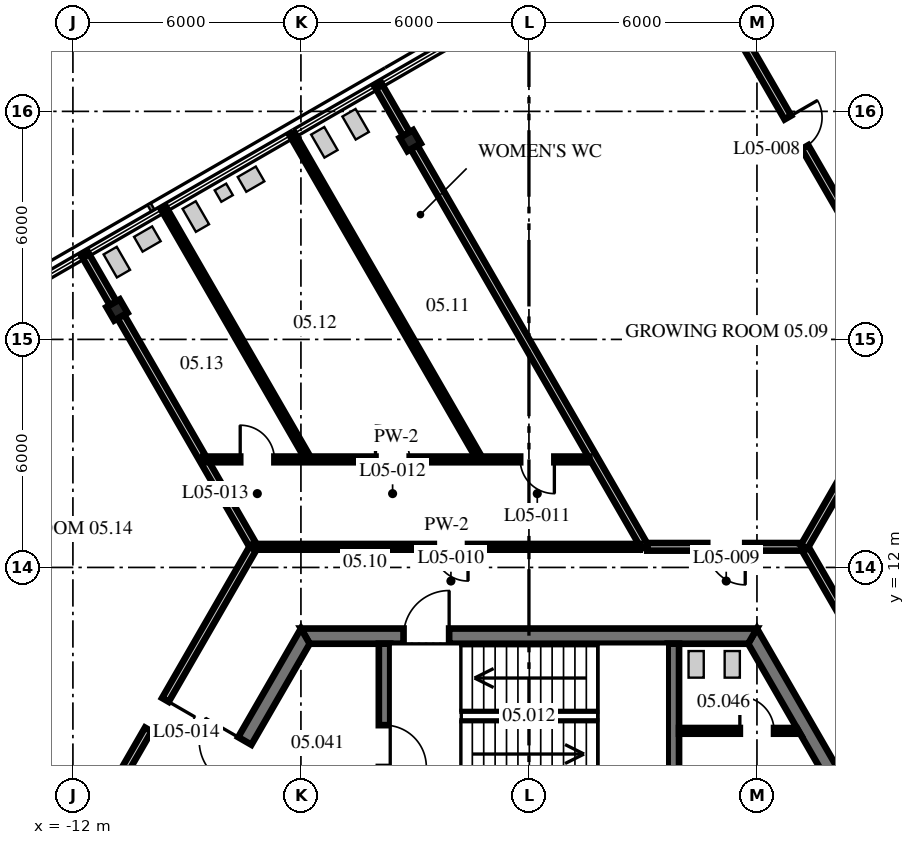
"""IFC4 building model, lengths in metres.
Left out: names, types, materials, properties, quantities, classifications, styles, units other than length and angle.
Written with IfcOpenShell. Run it as: python <this file> out.ifc"""

import sys

from ifc_helpers import new_model, si_unit, direction, frame, frame_2d, origin, origin_2d, place, context, subcontext, project, spatial, polyline, rectangle, i_section, outline, extrude, source, transform, mapped, element, fill, save


model = new_model("IFC4")
c1 = context("Model", 3, precision=1e-05, world=origin(), true_north=direction((0.0, 1.0)))
c2 = subcontext(c1, "Body", "Model", "MODEL_VIEW")
j1 = project(units=[si_unit("LENGTHUNIT", "METRE"), si_unit("PLANEANGLEUNIT", "RADIAN")], contexts=[c1])
p1 = place(None, origin())
s1 = spatial("IfcSite", under=j1, at=p1, CompositionType="ELEMENT")
p2 = place(p1, origin())
s2 = spatial("IfcBuilding", under=s1, at=p2, CompositionType="ELEMENT")
p3 = place(p2, frame((0.0, 0.0, 24.6)))
s3 = spatial("IfcBuildingStorey", under=s2, at=p3, CompositionType="ELEMENT", Elevation=24.6)
m1 = source(origin(), c2, "Body", "SweptSolid", [
    extrude(i_section(OverallWidth=0.404, OverallDepth=0.406, WebThickness=0.027, FlangeThickness=0.044, at=origin_2d()), origin(), (0.0, 0.0, 1.0), 4.3),
])
for number, where, z_axis, x_axis in (
    (1, (-3.124, 23.23, 0.0), (0.0, 0.0, 1.0), (-0.866, -0.5, 0.0)),
    (2, (-10.84, 18.775, 0.0), (0.0, 0.0, 1.0), (-0.866, -0.5, 0.0)),
):
    element("IfcColumn", number, at=place(p3, frame(where, z_axis=z_axis, x_axis=x_axis)), inside=s3, PredefinedType="COLUMN", context=c2, shape_type="MappedRepresentation", body=[
        mapped(m1, transform((0.0, 0.0, 0.0), scale=1.0)),
    ])
m2 = source(origin(), c2, "Body", "SweptSolid", [
    extrude(outline(polyline([(-0.115, -0.2), (11.885, -0.2), (11.654, 0.2), (0.115, 0.2), (-0.115, -0.2)])), origin(), (0.0, 0.0, 1.0), 4.1),
])
p4 = place(p3, frame((11.769, 0.0, 0.0), z_axis=(0.0, 0.0, 1.0), x_axis=(-0.499996592174, 0.866027371285, 0.0)))
e3 = element("IfcWall", 3, at=p4, inside=s3, PredefinedType="SHEAR", context=c2, shape_type="MappedRepresentation", body=[
    mapped(m2, transform((0.0, 0.0, 0.0), scale=1.0)),
])
p5 = place(p4, frame((5.75, 0.0, 0.0)))
e4 = element("IfcOpeningElement", 4, at=p5, cuts=e3, PredefinedType="OPENING", context=c2, shape_type="SweptSolid", body=[
    extrude(rectangle(XDim=1.2, YDim=2.1, at=frame_2d((0.6, 1.05))), frame((0.0, 0.21, 0.0), z_axis=(0.0, -1.0, 0.0), x_axis=(1.0, 0.0, 0.0)), (0.0, 0.0, 1.0), 0.42),
])
p6 = place(p3, frame((5.885, 10.192, 0.0), z_axis=(0.0, 0.0, 1.0), x_axis=(-1.0, 0.0, 0.0)))
e5 = element("IfcWall", 5, at=p6, inside=s3, PredefinedType="SHEAR", context=c2, shape_type="MappedRepresentation", body=[
    mapped(m2, transform((0.0, 0.0, 0.0), scale=1.0)),
])
p7 = place(p6, frame((7.985, 0.0, 0.0)))
e6 = element("IfcOpeningElement", 6, at=p7, cuts=e5, PredefinedType="OPENING", context=c2, shape_type="SweptSolid", body=[
    extrude(rectangle(XDim=1.2, YDim=2.1, at=frame_2d((0.6, 1.05))), frame((0.0, 0.21, 0.0), z_axis=(0.0, -1.0, 0.0), x_axis=(1.0, 0.0, 0.0)), (0.0, 0.0, 1.0), 0.42),
])
p8 = place(p3, frame((-5.885, 10.192, 0.0), z_axis=(0.0, 0.0, 1.0), x_axis=(-0.499996592174, -0.866027371285, 0.0)))
e7 = element("IfcWall", 7, at=p8, inside=s3, PredefinedType="SHEAR", context=c2, shape_type="MappedRepresentation", body=[
    mapped(m2, transform((0.0, 0.0, 0.0), scale=1.0)),
])
p9 = place(p8, frame((3.185, 0.0, 0.0)))
e8 = element("IfcOpeningElement", 8, at=p9, cuts=e7, PredefinedType="OPENING", context=c2, shape_type="SweptSolid", body=[
    extrude(rectangle(XDim=1.2, YDim=2.1, at=frame_2d((0.6, 1.05))), frame((0.0, 0.21, 0.0), z_axis=(0.0, -1.0, 0.0), x_axis=(1.0, 0.0, 0.0)), (0.0, 0.0, 1.0), 0.42),
])
m3 = source(origin(), c2, "Body", "SweptSolid", [
    extrude(outline(polyline([(0.0, -0.15), (0.0, 0.15), (3.804, 0.15), (3.804, -0.15), (0.0, -0.15)])), origin(), (0.0, 0.0, 1.0), 4.1),
])
p10 = place(p3, frame((-3.8, 6.19, 0.0), z_axis=(0.0, 0.0, 1.0), x_axis=(0.0, 1.0, 0.0)))
e9 = element("IfcWall", 9, at=p10, inside=s3, PredefinedType="SHEAR", context=c2, shape_type="MappedRepresentation", body=[
    mapped(m3, transform((0.0, 0.0, 0.0), scale=1.0)),
])
p11 = place(p10, frame((0.56, 0.0, 0.0)))
e10 = element("IfcOpeningElement", 10, at=p11, cuts=e9, PredefinedType="OPENING", context=c2, shape_type="SweptSolid", body=[
    extrude(rectangle(XDim=1.1, YDim=2.1, at=frame_2d((0.55, 1.05))), frame((0.0, 0.16, 0.0), z_axis=(0.0, -1.0, 0.0), x_axis=(1.0, 0.0, 0.0)), (0.0, 0.0, 1.0), 0.32),
])
p12 = place(p3, frame((3.8, 6.19, 0.0), z_axis=(0.0, 0.0, 1.0), x_axis=(0.0, 1.0, 0.0)))
e11 = element("IfcWall", 11, at=p12, inside=s3, PredefinedType="SHEAR", context=c2, shape_type="MappedRepresentation", body=[
    mapped(m3, transform((0.0, 0.0, 0.0), scale=1.0)),
])
m4 = source(origin(), c2, "Body", "SweptSolid", [
    extrude(outline(polyline([(0.0, -0.075), (0.0, 0.075), (3.102, 0.075), (3.188, -0.075), (0.0, -0.075)])), origin(), (0.0, 0.0, 1.0), 4.1),
])
p13 = place(p3, frame((3.95, 7.7, 0.0), z_axis=(0.0, 0.0, 1.0), x_axis=(1.0, 0.0, 0.0)))
e12 = element("IfcWall", 12, at=p13, inside=s3, PredefinedType="PARTITIONING", context=c2, shape_type="MappedRepresentation", body=[
    mapped(m4, transform((0.0, 0.0, 0.0), scale=1.0)),
])
p14 = place(p13, frame((1.6, 0.0, 0.0)))
e13 = element("IfcOpeningElement", 13, at=p14, cuts=e12, PredefinedType="OPENING", context=c2, shape_type="SweptSolid", body=[
    extrude(rectangle(XDim=0.9, YDim=2.1, at=frame_2d((0.45, 1.05))), frame((0.0, 0.085, 0.0), z_axis=(0.0, -1.0, 0.0), x_axis=(1.0, 0.0, 0.0)), (0.0, 0.0, 1.0), 0.17),
])
m5 = source(origin(), c2, "Body", "SweptSolid", [
    extrude(rectangle(XDim=12.148, YDim=0.2, at=frame_2d((6.074, 0.0))), origin(), (0.0, 0.0, 1.0), 3.343),
])
p15 = place(p3, frame((-18.459, 14.153, 0.0), z_axis=(0.0, 0.0, 1.0), x_axis=(0.500006022464, -0.866021926685, 0.0)))
e14 = element("IfcWall", 14, at=p15, inside=s3, PredefinedType="PARTITIONING", context=c2, shape_type="MappedRepresentation", body=[
    mapped(m5, transform((0.0, 0.0, 0.0), scale=1.0)),
])
m6 = source(origin(), c2, "Body", "SweptSolid", [
    extrude(rectangle(XDim=1.499, YDim=0.2, at=frame_2d((0.749, 0.0))), origin(), (0.0, 0.0, 1.0), 4.1),
])
p16 = place(p3, frame((-11.686, 20.24, 0.0), z_axis=(0.0, 0.0, 1.0), x_axis=(0.499976292358, -0.866039090965, 0.0)))
e15 = element("IfcWall", 15, at=p16, inside=s3, PredefinedType="PARTITIONING", context=c2, shape_type="MappedRepresentation", body=[
    mapped(m6, transform((0.0, 0.0, 0.0), scale=1.0)),
])
m7 = source(origin(), c2, "Body", "SweptSolid", [
    extrude(rectangle(XDim=6.934, YDim=0.2, at=frame_2d((3.467, 0.0))), origin(), (0.0, 0.0, 1.0), 3.488),
])
p17 = place(p3, frame((-10.743, 18.608, 0.0), z_axis=(0.0, 0.0, 1.0), x_axis=(0.499986605379, -0.866033137035, 0.0)))
e16 = element("IfcWall", 16, at=p17, inside=s3, PredefinedType="PARTITIONING", context=c2, shape_type="MappedRepresentation", body=[
    mapped(m7, transform((0.0, 0.0, 0.0), scale=1.0)),
])
m8 = source(origin(), c2, "Body", "SweptSolid", [
    extrude(rectangle(XDim=7.509, YDim=0.15, at=frame_2d((3.754, 0.0))), origin(), (0.0, 0.0, 1.0), 4.1),
])
p18 = place(p3, frame((-9.607, 21.44, 0.0), z_axis=(0.0, 0.0, 1.0), x_axis=(0.500006720231, -0.866021523823, 0.0)))
e17 = element("IfcWall", 17, at=p18, inside=s3, PredefinedType="PARTITIONING", context=c2, shape_type="MappedRepresentation", body=[
    mapped(m8, transform((0.0, 0.0, 0.0), scale=1.0)),
])
m9 = source(origin(), c2, "Body", "SweptSolid", [
    extrude(rectangle(XDim=9.764, YDim=0.15, at=frame_2d((4.882, 0.0))), origin(), (0.0, 0.0, 1.0), 4.1),
])
p19 = place(p3, frame((-6.225, 23.393, 0.0), z_axis=(0.0, 0.0, 1.0), x_axis=(0.499990124937, -0.86603110508, 0.0)))
e18 = element("IfcWall", 18, at=p19, inside=s3, PredefinedType="PARTITIONING", context=c2, shape_type="MappedRepresentation", body=[
    mapped(m9, transform((0.0, 0.0, 0.0), scale=1.0)),
])
m10 = source(origin(), c2, "Body", "SweptSolid", [
    extrude(rectangle(XDim=1.499, YDim=0.2, at=frame_2d((0.75, 0.0))), origin(), (0.0, 0.0, 1.0), 4.1),
])
p20 = place(p3, frame((-3.969, 24.695, 0.0), z_axis=(0.0, 0.0, 1.0), x_axis=(0.499905760005, -0.866079806435, 0.0)))
e19 = element("IfcWall", 19, at=p20, inside=s3, PredefinedType="PARTITIONING", context=c2, shape_type="MappedRepresentation", body=[
    mapped(m10, transform((0.0, 0.0, 0.0), scale=1.0)),
])
m11 = source(origin(), c2, "Body", "SweptSolid", [
    extrude(rectangle(XDim=12.148, YDim=0.2, at=frame_2d((6.074, 0.0))), origin(), (0.0, 0.0, 1.0), 3.343),
])
p21 = place(p3, frame((-3.027, 23.063, 0.0), z_axis=(0.0, 0.0, 1.0), x_axis=(0.499997320042, -0.866026951053, 0.0)))
e20 = element("IfcWall", 20, at=p21, inside=s3, PredefinedType="PARTITIONING", context=c2, shape_type="MappedRepresentation", body=[
    mapped(m11, transform((0.0, 0.0, 0.0), scale=1.0)),
])
m12 = source(origin(), c2, "Body", "SweptSolid", [
    extrude(rectangle(XDim=3.885, YDim=0.2, at=frame_2d((1.942, 0.0))), origin(), (0.0, 0.0, 1.0), 4.1),
])
p22 = place(p3, frame((7.276, 12.482, 0.0), z_axis=(0.0, 0.0, 1.0), x_axis=(0.499978127697, -0.866038031396, 0.0)))
e21 = element("IfcWall", 21, at=p22, inside=s3, PredefinedType="PARTITIONING", context=c2, shape_type="MappedRepresentation", body=[
    mapped(m12, transform((0.0, 0.0, 0.0), scale=1.0)),
])
m13 = source(origin(), c2, "Body", "SweptSolid", [
    extrude(rectangle(XDim=7.568, YDim=0.2, at=frame_2d((3.784, 0.0))), origin(), (0.0, 0.0, 1.0), 3.488),
])
p23 = place(p3, frame((4.689, 27.518, 0.0), z_axis=(0.0, 0.0, 1.0), x_axis=(0.499997032024, -0.866027117339, 0.0)))
e22 = element("IfcWall", 22, at=p23, inside=s3, PredefinedType="PARTITIONING", context=c2, shape_type="MappedRepresentation", body=[
    mapped(m13, transform((0.0, 0.0, 0.0), scale=1.0)),
])
p24 = place(p23, frame((4.248, 0.0, 0.0)))
e23 = element("IfcOpeningElement", 23, at=p24, cuts=e22, PredefinedType="OPENING", context=c2, shape_type="SweptSolid", body=[
    extrude(rectangle(XDim=0.9, YDim=2.1, at=frame_2d((0.45, 1.05))), frame((0.0, 0.11, 0.0), z_axis=(0.0, -1.0, 0.0), x_axis=(1.0, 0.0, 0.0)), (0.0, 0.0, 1.0), 0.22),
])
m14 = source(origin(), c2, "Body", "SweptSolid", [
    extrude(rectangle(XDim=10.155, YDim=0.15, at=frame_2d((5.077, 0.0))), origin(), (0.0, 0.0, 1.0), 4.1),
])
p25 = place(p3, frame((-7.241, 12.542, 0.0), z_axis=(0.0, 0.0, 1.0), x_axis=(1.0, 0.0, 0.0)))
e24 = element("IfcWall", 24, at=p25, inside=s3, PredefinedType="PARTITIONING", context=c2, shape_type="MappedRepresentation", body=[
    mapped(m14, transform((0.0, 0.0, 0.0), scale=1.0)),
])
p26 = place(p25, frame((4.738, 0.0, 0.0)))
e25 = element("IfcOpeningElement", 25, at=p26, cuts=e24, PredefinedType="OPENING", context=c2, shape_type="SweptSolid", body=[
    extrude(rectangle(XDim=0.9, YDim=2.1, at=frame_2d((0.45, 1.05))), frame((0.0, 0.085, 0.0), z_axis=(0.0, -1.0, 0.0), x_axis=(1.0, 0.0, 0.0)), (0.0, 0.0, 1.0), 0.17),
])
m15 = source(origin(), c2, "Body", "SweptSolid", [
    extrude(rectangle(XDim=4.058, YDim=0.2, at=frame_2d((2.029, 0.0))), origin(), (0.0, 0.0, 1.0), 4.1),
])
p27 = place(p3, frame((3.114, 12.542, 0.0), z_axis=(0.0, 0.0, 1.0), x_axis=(1.0, 0.0, 0.0)))
e26 = element("IfcWall", 26, at=p27, inside=s3, PredefinedType="PARTITIONING", context=c2, shape_type="MappedRepresentation", body=[
    mapped(m15, transform((0.0, 0.0, 0.0), scale=1.0)),
])
p28 = place(p27, frame((1.578, 0.0, 0.0)))
e27 = element("IfcOpeningElement", 27, at=p28, cuts=e26, PredefinedType="OPENING", context=c2, shape_type="SweptSolid", body=[
    extrude(rectangle(XDim=1.0, YDim=2.1, at=frame_2d((0.5, 1.05))), frame((0.0, 0.11, 0.0), z_axis=(0.0, -1.0, 0.0), x_axis=(1.0, 0.0, 0.0)), (0.0, 0.0, 1.0), 0.22),
])
m16 = source(origin(), c2, "Body", "SweptSolid", [
    extrude(rectangle(XDim=10.158, YDim=0.15, at=frame_2d((5.079, 0.0))), origin(), (0.0, 0.0, 1.0), 4.1),
])
p29 = place(p3, frame((-8.569, 14.842, 0.0), z_axis=(0.0, 0.0, 1.0), x_axis=(1.0, 0.0, 0.0)))
e28 = element("IfcWall", 28, at=p29, inside=s3, PredefinedType="PARTITIONING", context=c2, shape_type="MappedRepresentation", body=[
    mapped(m16, transform((0.0, 0.0, 0.0), scale=1.0)),
])
p30 = place(p29, frame((8.338, 0.0, 0.0)))
e29 = element("IfcOpeningElement", 29, at=p30, cuts=e28, PredefinedType="OPENING", context=c2, shape_type="SweptSolid", body=[
    extrude(rectangle(XDim=0.9, YDim=2.1, at=frame_2d((0.45, 1.05))), frame((0.0, 0.085, 0.0), z_axis=(0.0, -1.0, 0.0), x_axis=(1.0, 0.0, 0.0)), (0.0, 0.0, 1.0), 0.17),
])
p31 = place(p29, frame((4.531, 0.0, 0.0)))
e30 = element("IfcOpeningElement", 30, at=p31, cuts=e28, PredefinedType="OPENING", context=c2, shape_type="SweptSolid", body=[
    extrude(rectangle(XDim=0.9, YDim=2.1, at=frame_2d((0.45, 1.05))), frame((0.0, 0.085, 0.0), z_axis=(0.0, -1.0, 0.0), x_axis=(1.0, 0.0, 0.0)), (0.0, 0.0, 1.0), 0.17),
])
p32 = place(p29, frame((0.971, 0.0, 0.0)))
e31 = element("IfcOpeningElement", 31, at=p32, cuts=e28, PredefinedType="OPENING", context=c2, shape_type="SweptSolid", body=[
    extrude(rectangle(XDim=0.9, YDim=2.1, at=frame_2d((0.45, 1.05))), frame((0.0, 0.085, 0.0), z_axis=(0.0, -1.0, 0.0), x_axis=(1.0, 0.0, 0.0)), (0.0, 0.0, 1.0), 0.17),
])
m17 = source(origin(), c2, "Body", "SweptSolid", [
    extrude(rectangle(XDim=10.136, YDim=0.2, at=frame_2d((5.068, 0.0))), origin(), (0.0, 0.0, 1.0), 4.1),
])
p33 = place(p3, frame((7.241, 12.542, 0.0), z_axis=(0.0, 0.0, 1.0), x_axis=(0.49999906822, 0.866025941747, 0.0)))
e32 = element("IfcWall", 32, at=p33, inside=s3, PredefinedType="PARTITIONING", context=c2, shape_type="MappedRepresentation", body=[
    mapped(m17, transform((0.0, 0.0, 0.0), scale=1.0)),
])
m18 = source(origin(), c2, "Body", "SweptSolid", [
    extrude(rectangle(XDim=10.082, YDim=0.2, at=frame_2d((5.041, 0.0))), origin(), (0.0, 0.0, 1.0), 4.1),
])
p34 = place(p3, frame((-12.307, 3.768, 0.0), z_axis=(0.0, 0.0, 1.0), x_axis=(0.500014523669, 0.866017018378, 0.0)))
e33 = element("IfcWall", 33, at=p34, inside=s3, PredefinedType="PARTITIONING", context=c2, shape_type="MappedRepresentation", body=[
    mapped(m18, transform((0.0, 0.0, 0.0), scale=1.0)),
])
p35 = place(p34, frame((4.582, 0.0, 0.0)))
e34 = element("IfcOpeningElement", 34, at=p35, cuts=e33, PredefinedType="OPENING", context=c2, shape_type="SweptSolid", body=[
    extrude(rectangle(XDim=0.9, YDim=2.1, at=frame_2d((0.45, 1.05))), frame((0.0, 0.11, 0.0), z_axis=(0.0, -1.0, 0.0), x_axis=(1.0, 0.0, 0.0)), (0.0, 0.0, 1.0), 0.22),
])
p36 = place(p7, frame((1.2, 0.0, 0.0), z_axis=(0.0, 0.0, 1.0), x_axis=(-1.0, 0.0, 0.0)))
e35 = element("IfcDoor", 35, at=p36, inside=s3, OperationType="SINGLE_SWING_RIGHT", PredefinedType="DOOR", context=c2, shape_type="SweptSolid", body=[
    extrude(rectangle(XDim=1.2, YDim=2.1, at=frame_2d((0.6, 1.05))), frame((0.0, 0.025, 0.0), z_axis=(0.0, -1.0, 0.0), x_axis=(1.0, 0.0, 0.0)), (0.0, 0.0, 1.0), 0.05),
])
fill(e6, e35)
p37 = place(p9, frame((1.2, 0.0, 0.0), z_axis=(0.0, 0.0, 1.0), x_axis=(-1.0, 0.0, 0.0)))
e36 = element("IfcDoor", 36, at=p37, inside=s3, OperationType="SINGLE_SWING_RIGHT", PredefinedType="DOOR", context=c2, shape_type="SweptSolid", body=[
    extrude(rectangle(XDim=1.2, YDim=2.1, at=frame_2d((0.6, 1.05))), frame((0.0, 0.025, 0.0), z_axis=(0.0, -1.0, 0.0), x_axis=(1.0, 0.0, 0.0)), (0.0, 0.0, 1.0), 0.05),
])
fill(e8, e36)
p38 = place(p11, frame((1.1, 0.0, 0.0), z_axis=(0.0, 0.0, 1.0), x_axis=(-1.0, 0.0, 0.0)))
e37 = element("IfcDoor", 37, at=p38, inside=s3, OperationType="SINGLE_SWING_RIGHT", PredefinedType="DOOR", context=c2, shape_type="SweptSolid", body=[
    extrude(rectangle(XDim=1.1, YDim=2.1, at=frame_2d((0.55, 1.05))), frame((0.0, 0.025, 0.0), z_axis=(0.0, -1.0, 0.0), x_axis=(1.0, 0.0, 0.0)), (0.0, 0.0, 1.0), 0.05),
])
fill(e10, e37)
p39 = place(p14, origin())
e38 = element("IfcDoor", 38, at=p39, inside=s3, OperationType="SINGLE_SWING_LEFT", PredefinedType="DOOR", context=c2, shape_type="SweptSolid", body=[
    extrude(rectangle(XDim=0.9, YDim=2.1, at=frame_2d((0.45, 1.05))), frame((0.0, 0.025, 0.0), z_axis=(0.0, -1.0, 0.0), x_axis=(1.0, 0.0, 0.0)), (0.0, 0.0, 1.0), 0.05),
])
fill(e13, e38)
p40 = place(p24, origin())
e39 = element("IfcDoor", 39, at=p40, inside=s3, OperationType="SINGLE_SWING_LEFT", PredefinedType="DOOR", context=c2, shape_type="SweptSolid", body=[
    extrude(rectangle(XDim=0.9, YDim=2.1, at=frame_2d((0.45, 1.05))), frame((0.0, 0.025, 0.0), z_axis=(0.0, -1.0, 0.0), x_axis=(1.0, 0.0, 0.0)), (0.0, 0.0, 1.0), 0.05),
])
fill(e23, e39)
p41 = place(p28, origin())
e40 = element("IfcDoor", 40, at=p41, inside=s3, OperationType="SINGLE_SWING_RIGHT", PredefinedType="DOOR", context=c2, shape_type="SweptSolid", body=[
    extrude(rectangle(XDim=1.0, YDim=2.1, at=frame_2d((0.5, 1.05))), frame((0.0, 0.025, 0.0), z_axis=(0.0, -1.0, 0.0), x_axis=(1.0, 0.0, 0.0)), (0.0, 0.0, 1.0), 0.05),
])
fill(e27, e40)
p42 = place(p26, origin())
e41 = element("IfcDoor", 41, at=p42, inside=s3, OperationType="SINGLE_SWING_RIGHT", PredefinedType="DOOR", context=c2, shape_type="SweptSolid", body=[
    extrude(rectangle(XDim=0.9, YDim=2.1, at=frame_2d((0.45, 1.05))), frame((0.0, 0.025, 0.0), z_axis=(0.0, -1.0, 0.0), x_axis=(1.0, 0.0, 0.0)), (0.0, 0.0, 1.0), 0.05),
])
fill(e25, e41)
p43 = place(p30, origin())
e42 = element("IfcDoor", 42, at=p43, inside=s3, OperationType="SINGLE_SWING_RIGHT", PredefinedType="DOOR", context=c2, shape_type="SweptSolid", body=[
    extrude(rectangle(XDim=0.9, YDim=2.1, at=frame_2d((0.45, 1.05))), frame((0.0, 0.025, 0.0), z_axis=(0.0, -1.0, 0.0), x_axis=(1.0, 0.0, 0.0)), (0.0, 0.0, 1.0), 0.05),
])
fill(e29, e42)
p44 = place(p31, origin())
e43 = element("IfcDoor", 43, at=p44, inside=s3, OperationType="SINGLE_SWING_LEFT", PredefinedType="DOOR", context=c2, shape_type="SweptSolid", body=[
    extrude(rectangle(XDim=0.9, YDim=2.1, at=frame_2d((0.45, 1.05))), frame((0.0, 0.025, 0.0), z_axis=(0.0, -1.0, 0.0), x_axis=(1.0, 0.0, 0.0)), (0.0, 0.0, 1.0), 0.05),
])
fill(e30, e43)
p45 = place(p32, origin())
e44 = element("IfcDoor", 44, at=p45, inside=s3, OperationType="SINGLE_SWING_LEFT", PredefinedType="DOOR", context=c2, shape_type="SweptSolid", body=[
    extrude(rectangle(XDim=0.9, YDim=2.1, at=frame_2d((0.45, 1.05))), frame((0.0, 0.025, 0.0), z_axis=(0.0, -1.0, 0.0), x_axis=(1.0, 0.0, 0.0)), (0.0, 0.0, 1.0), 0.05),
])
fill(e31, e44)
p46 = place(p35, origin())
e45 = element("IfcDoor", 45, at=p46, inside=s3, OperationType="SINGLE_SWING_RIGHT", PredefinedType="DOOR", context=c2, shape_type="SweptSolid", body=[
    extrude(rectangle(XDim=0.9, YDim=2.1, at=frame_2d((0.45, 1.05))), frame((0.0, 0.025, 0.0), z_axis=(0.0, -1.0, 0.0), x_axis=(1.0, 0.0, 0.0)), (0.0, 0.0, 1.0), 0.05),
])
fill(e34, e45)
save(model, sys.argv[1])
